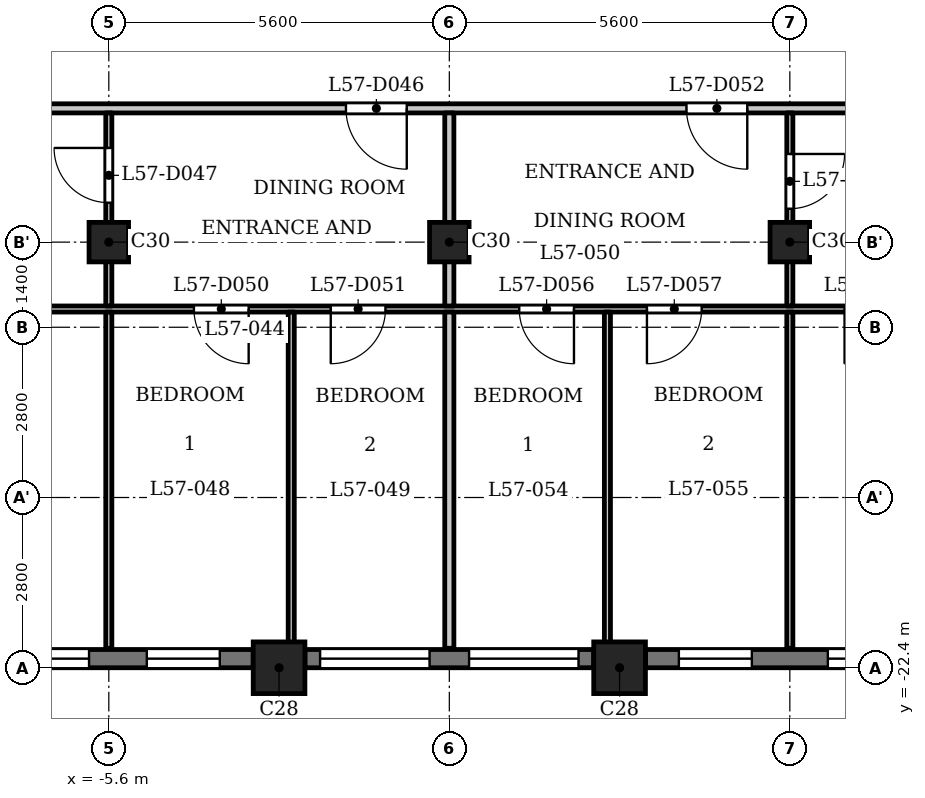
"""IFC4 building model, lengths in metres.
Left out: names, types, materials, properties, quantities, classifications, styles, units other than length and angle.
Written with IfcOpenShell. Run it as: python <this file> out.ifc"""

import sys

from ifc_helpers import new_model, si_unit, direction, frame, frame_2d, origin, origin_2d, place, context, subcontext, project, spatial, rectangle, extrude, element, fill, save


model = new_model("IFC4")
c1 = context("Model", 3, precision=1e-05, world=origin(), true_north=direction((0.0, 1.0)))
c2 = subcontext(c1, "Body", "Model", "MODEL_VIEW")
j1 = project(units=[si_unit("LENGTHUNIT", "METRE"), si_unit("PLANEANGLEUNIT", "RADIAN")], contexts=[c1])
p1 = place(None, origin())
s1 = spatial("IfcSite", under=j1, at=p1, CompositionType="ELEMENT")
p2 = place(p1, origin())
s2 = spatial("IfcBuilding", under=s1, at=p2, CompositionType="ELEMENT")
p3 = place(p2, frame((0.0, 0.0, 220.4)))
s3 = spatial("IfcBuildingStorey", under=s2, at=p3, CompositionType="ELEMENT", Elevation=220.4)
for number, where, z_axis, x_axis in (
    (1, (-2.8, -22.4, 0.0), (0.0, 0.0, 1.0), (1.0, 0.0, 0.0)),
    (2, (2.8, -22.4, 0.0), (0.0, 0.0, 1.0), (1.0, 0.0, 0.0)),
):
    element("IfcColumn", number, at=place(p3, frame(where, z_axis=z_axis, x_axis=x_axis)), inside=s3, PredefinedType="COLUMN", context=c2, shape_type="SweptSolid", body=[
        extrude(rectangle(XDim=0.85, YDim=0.85, at=origin_2d()), origin(), (0.0, 0.0, 1.0), 3.5),
    ])
for number, where, z_axis, x_axis in (
    (3, (-5.6, -15.4, 0.0), (0.0, 0.0, 1.0), (1.0, 0.0, 0.0)),
    (4, (0.0, -15.4, 0.0), (0.0, 0.0, 1.0), (1.0, 0.0, 0.0)),
    (5, (5.6, -15.4, 0.0), (0.0, 0.0, 1.0), (1.0, 0.0, 0.0)),
):
    element("IfcColumn", number, at=place(p3, frame(where, z_axis=z_axis, x_axis=x_axis)), inside=s3, PredefinedType="COLUMN", context=c2, shape_type="SweptSolid", body=[
        extrude(rectangle(XDim=0.65, YDim=0.65, at=origin_2d()), origin(), (0.0, 0.0, 1.0), 3.5),
    ])
p4 = place(p3, frame((-7.975, -22.25, 0.0), z_axis=(0.0, 0.0, 1.0), x_axis=(1.0, 0.0, 0.0)))
e6 = element("IfcWall", 6, at=p4, inside=s3, PredefinedType="SOLIDWALL", context=c2, shape_type="SweptSolid", body=[
    extrude(rectangle(XDim=4.75, YDim=0.3, at=frame_2d((2.375, 0.0))), origin(), (0.0, 0.0, 1.0), 2.5),
])
p5 = place(p4, frame((0.25, 0.0, 0.9)))
e7 = element("IfcOpeningElement", 7, at=p5, cuts=e6, PredefinedType="OPENING", context=c2, shape_type="SweptSolid", body=[
    extrude(rectangle(XDim=1.8, YDim=1.25, at=frame_2d((0.9, 0.625))), frame((0.0, 0.16, 0.0), z_axis=(0.0, -1.0, 0.0), x_axis=(1.0, 0.0, 0.0)), (0.0, 0.0, 1.0), 0.32),
])
p6 = place(p4, frame((3.0, 0.0, 0.6)))
e8 = element("IfcOpeningElement", 8, at=p6, cuts=e6, PredefinedType="OPENING", context=c2, shape_type="SweptSolid", body=[
    extrude(rectangle(XDim=1.2, YDim=1.55, at=frame_2d((0.6, 0.775))), frame((0.0, 0.16, 0.0), z_axis=(0.0, -1.0, 0.0), x_axis=(1.0, 0.0, 0.0)), (0.0, 0.0, 1.0), 0.32),
])
p7 = place(p3, frame((-2.375, -22.25, 0.0), z_axis=(0.0, 0.0, 1.0), x_axis=(1.0, 0.0, 0.0)))
e9 = element("IfcWall", 9, at=p7, inside=s3, PredefinedType="SOLIDWALL", context=c2, shape_type="SweptSolid", body=[
    extrude(rectangle(XDim=4.75, YDim=0.3, at=frame_2d((2.375, 0.0))), origin(), (0.0, 0.0, 1.0), 2.5),
])
p8 = place(p7, frame((0.25, 0.0, 0.9)))
e10 = element("IfcOpeningElement", 10, at=p8, cuts=e9, PredefinedType="OPENING", context=c2, shape_type="SweptSolid", body=[
    extrude(rectangle(XDim=1.8, YDim=1.25, at=frame_2d((0.9, 0.625))), frame((0.0, 0.16, 0.0), z_axis=(0.0, -1.0, 0.0), x_axis=(1.0, 0.0, 0.0)), (0.0, 0.0, 1.0), 0.32),
])
p9 = place(p7, frame((2.7, 0.0, 0.9)))
e11 = element("IfcOpeningElement", 11, at=p9, cuts=e9, PredefinedType="OPENING", context=c2, shape_type="SweptSolid", body=[
    extrude(rectangle(XDim=1.8, YDim=1.25, at=frame_2d((0.9, 0.625))), frame((0.0, 0.16, 0.0), z_axis=(0.0, -1.0, 0.0), x_axis=(1.0, 0.0, 0.0)), (0.0, 0.0, 1.0), 0.32),
])
p10 = place(p3, frame((3.225, -22.25, 0.0), z_axis=(0.0, 0.0, 1.0), x_axis=(1.0, 0.0, 0.0)))
e12 = element("IfcWall", 12, at=p10, inside=s3, PredefinedType="SOLIDWALL", context=c2, shape_type="SweptSolid", body=[
    extrude(rectangle(XDim=4.75, YDim=0.3, at=frame_2d((2.375, 0.0))), origin(), (0.0, 0.0, 1.0), 2.5),
])
p11 = place(p10, frame((0.55, 0.0, 0.6)))
e13 = element("IfcOpeningElement", 13, at=p11, cuts=e12, PredefinedType="OPENING", context=c2, shape_type="SweptSolid", body=[
    extrude(rectangle(XDim=1.2, YDim=1.55, at=frame_2d((0.6, 0.775))), frame((0.0, 0.16, 0.0), z_axis=(0.0, -1.0, 0.0), x_axis=(1.0, 0.0, 0.0)), (0.0, 0.0, 1.0), 0.32),
])
p12 = place(p10, frame((3.0, 0.0, 0.6)))
e14 = element("IfcOpeningElement", 14, at=p12, cuts=e12, PredefinedType="OPENING", context=c2, shape_type="SweptSolid", body=[
    extrude(rectangle(XDim=1.2, YDim=1.55, at=frame_2d((0.6, 0.775))), frame((0.0, 0.16, 0.0), z_axis=(0.0, -1.0, 0.0), x_axis=(1.0, 0.0, 0.0)), (0.0, 0.0, 1.0), 0.32),
])
p13 = place(p3, frame((-16.725, -16.5, 0.0), z_axis=(0.0, 0.0, 1.0), x_axis=(1.0, 0.0, 0.0)))
e15 = element("IfcWall", 15, at=p13, inside=s3, PredefinedType="PARTITIONING", context=c2, shape_type="SweptSolid", body=[
    extrude(rectangle(XDim=33.45, YDim=0.1, at=frame_2d((16.725, 0.0))), origin(), (0.0, 0.0, 1.0), 3.2),
])
p14 = place(p13, frame((0.675, 0.0, 0.0)))
e16 = element("IfcOpeningElement", 16, at=p14, cuts=e15, PredefinedType="OPENING", context=c2, shape_type="SweptSolid", body=[
    extrude(rectangle(XDim=0.8, YDim=2.1, at=frame_2d((0.4, 1.05))), frame((0.0, 0.06, 0.0), z_axis=(0.0, -1.0, 0.0), x_axis=(1.0, 0.0, 0.0)), (0.0, 0.0, 1.0), 0.12),
])
p15 = place(p13, frame((2.775, 0.0, 0.0)))
e17 = element("IfcOpeningElement", 17, at=p15, cuts=e15, PredefinedType="OPENING", context=c2, shape_type="SweptSolid", body=[
    extrude(rectangle(XDim=0.9, YDim=2.1, at=frame_2d((0.45, 1.05))), frame((0.0, 0.06, 0.0), z_axis=(0.0, -1.0, 0.0), x_axis=(1.0, 0.0, 0.0)), (0.0, 0.0, 1.0), 0.12),
])
p16 = place(p13, frame((6.425, 0.0, 0.0)))
e18 = element("IfcOpeningElement", 18, at=p16, cuts=e15, PredefinedType="OPENING", context=c2, shape_type="SweptSolid", body=[
    extrude(rectangle(XDim=0.8, YDim=2.1, at=frame_2d((0.4, 1.05))), frame((0.0, 0.06, 0.0), z_axis=(0.0, -1.0, 0.0), x_axis=(1.0, 0.0, 0.0)), (0.0, 0.0, 1.0), 0.12),
])
p17 = place(p13, frame((8.775, 0.0, 0.0)))
e19 = element("IfcOpeningElement", 19, at=p17, cuts=e15, PredefinedType="OPENING", context=c2, shape_type="SweptSolid", body=[
    extrude(rectangle(XDim=0.9, YDim=2.1, at=frame_2d((0.45, 1.05))), frame((0.0, 0.06, 0.0), z_axis=(0.0, -1.0, 0.0), x_axis=(1.0, 0.0, 0.0)), (0.0, 0.0, 1.0), 0.12),
])
p18 = place(p13, frame((12.525, 0.0, 0.0)))
e20 = element("IfcOpeningElement", 20, at=p18, cuts=e15, PredefinedType="OPENING", context=c2, shape_type="SweptSolid", body=[
    extrude(rectangle(XDim=0.9, YDim=2.1, at=frame_2d((0.45, 1.05))), frame((0.0, 0.06, 0.0), z_axis=(0.0, -1.0, 0.0), x_axis=(1.0, 0.0, 0.0)), (0.0, 0.0, 1.0), 0.12),
])
p19 = place(p13, frame((14.775, 0.0, 0.0)))
e21 = element("IfcOpeningElement", 21, at=p19, cuts=e15, PredefinedType="OPENING", context=c2, shape_type="SweptSolid", body=[
    extrude(rectangle(XDim=0.9, YDim=2.1, at=frame_2d((0.45, 1.05))), frame((0.0, 0.06, 0.0), z_axis=(0.0, -1.0, 0.0), x_axis=(1.0, 0.0, 0.0)), (0.0, 0.0, 1.0), 0.12),
])
p20 = place(p13, frame((25.475, 0.0, 0.0)))
e22 = element("IfcOpeningElement", 22, at=p20, cuts=e15, PredefinedType="OPENING", context=c2, shape_type="SweptSolid", body=[
    extrude(rectangle(XDim=0.8, YDim=2.1, at=frame_2d((0.4, 1.05))), frame((0.0, 0.06, 0.0), z_axis=(0.0, -1.0, 0.0), x_axis=(1.0, 0.0, 0.0)), (0.0, 0.0, 1.0), 0.12),
])
p21 = place(p13, frame((23.225, 0.0, 0.0)))
e23 = element("IfcOpeningElement", 23, at=p21, cuts=e15, PredefinedType="OPENING", context=c2, shape_type="SweptSolid", body=[
    extrude(rectangle(XDim=0.9, YDim=2.1, at=frame_2d((0.45, 1.05))), frame((0.0, 0.06, 0.0), z_axis=(0.0, -1.0, 0.0), x_axis=(1.0, 0.0, 0.0)), (0.0, 0.0, 1.0), 0.12),
])
p22 = place(p13, frame((17.875, 0.0, 0.0)))
e24 = element("IfcOpeningElement", 24, at=p22, cuts=e15, PredefinedType="OPENING", context=c2, shape_type="SweptSolid", body=[
    extrude(rectangle(XDim=0.9, YDim=2.1, at=frame_2d((0.45, 1.05))), frame((0.0, 0.06, 0.0), z_axis=(0.0, -1.0, 0.0), x_axis=(1.0, 0.0, 0.0)), (0.0, 0.0, 1.0), 0.12),
])
p23 = place(p13, frame((19.975, 0.0, 0.0)))
e25 = element("IfcOpeningElement", 25, at=p23, cuts=e15, PredefinedType="OPENING", context=c2, shape_type="SweptSolid", body=[
    extrude(rectangle(XDim=0.9, YDim=2.1, at=frame_2d((0.45, 1.05))), frame((0.0, 0.06, 0.0), z_axis=(0.0, -1.0, 0.0), x_axis=(1.0, 0.0, 0.0)), (0.0, 0.0, 1.0), 0.12),
])
p24 = place(p13, frame((30.825, 0.0, 0.0)))
e26 = element("IfcOpeningElement", 26, at=p24, cuts=e15, PredefinedType="OPENING", context=c2, shape_type="SweptSolid", body=[
    extrude(rectangle(XDim=0.8, YDim=2.1, at=frame_2d((0.4, 1.05))), frame((0.0, 0.06, 0.0), z_axis=(0.0, -1.0, 0.0), x_axis=(1.0, 0.0, 0.0)), (0.0, 0.0, 1.0), 0.12),
])
p25 = place(p13, frame((29.075, 0.0, 0.0)))
e27 = element("IfcOpeningElement", 27, at=p25, cuts=e15, PredefinedType="OPENING", context=c2, shape_type="SweptSolid", body=[
    extrude(rectangle(XDim=0.9, YDim=2.1, at=frame_2d((0.45, 1.05))), frame((0.0, 0.06, 0.0), z_axis=(0.0, -1.0, 0.0), x_axis=(1.0, 0.0, 0.0)), (0.0, 0.0, 1.0), 0.12),
])
p26 = place(p3, frame((-17.4, -13.2, 0.0), z_axis=(0.0, 0.0, 1.0), x_axis=(1.0, 0.0, 0.0)))
e28 = element("IfcWall", 28, at=p26, inside=s3, PredefinedType="PARTITIONING", context=c2, shape_type="SweptSolid", body=[
    extrude(rectangle(XDim=34.8, YDim=0.15, at=frame_2d((17.4, 0.0))), origin(), (0.0, 0.0, 1.0), 3.2),
])
p27 = place(p26, frame((0.15, 0.0, 0.0)))
e29 = element("IfcOpeningElement", 29, at=p27, cuts=e28, PredefinedType="OPENING", context=c2, shape_type="SweptSolid", body=[
    extrude(rectangle(XDim=1.0, YDim=2.1, at=frame_2d((0.5, 1.05))), frame((0.0, 0.085, 0.0), z_axis=(0.0, -1.0, 0.0), x_axis=(1.0, 0.0, 0.0)), (0.0, 0.0, 1.0), 0.17),
])
p28 = place(p26, frame((33.55, 0.0, 0.0)))
e30 = element("IfcOpeningElement", 30, at=p28, cuts=e28, PredefinedType="OPENING", context=c2, shape_type="SweptSolid", body=[
    extrude(rectangle(XDim=1.0, YDim=2.1, at=frame_2d((0.5, 1.05))), frame((0.0, 0.085, 0.0), z_axis=(0.0, -1.0, 0.0), x_axis=(1.0, 0.0, 0.0)), (0.0, 0.0, 1.0), 0.17),
])
p29 = place(p26, frame((3.7, 0.0, 0.0)))
e31 = element("IfcOpeningElement", 31, at=p29, cuts=e28, PredefinedType="OPENING", context=c2, shape_type="SweptSolid", body=[
    extrude(rectangle(XDim=1.0, YDim=2.1, at=frame_2d((0.5, 1.05))), frame((0.0, 0.085, 0.0), z_axis=(0.0, -1.0, 0.0), x_axis=(1.0, 0.0, 0.0)), (0.0, 0.0, 1.0), 0.17),
])
p30 = place(p26, frame((15.7, 0.0, 0.0)))
e32 = element("IfcOpeningElement", 32, at=p30, cuts=e28, PredefinedType="OPENING", context=c2, shape_type="SweptSolid", body=[
    extrude(rectangle(XDim=1.0, YDim=2.1, at=frame_2d((0.5, 1.05))), frame((0.0, 0.085, 0.0), z_axis=(0.0, -1.0, 0.0), x_axis=(1.0, 0.0, 0.0)), (0.0, 0.0, 1.0), 0.17),
])
p31 = place(p26, frame((21.3, 0.0, 0.0)))
e33 = element("IfcOpeningElement", 33, at=p31, cuts=e28, PredefinedType="OPENING", context=c2, shape_type="SweptSolid", body=[
    extrude(rectangle(XDim=1.0, YDim=2.1, at=frame_2d((0.5, 1.05))), frame((0.0, 0.085, 0.0), z_axis=(0.0, -1.0, 0.0), x_axis=(1.0, 0.0, 0.0)), (0.0, 0.0, 1.0), 0.17),
])
p32 = place(p26, frame((29.5, 0.0, 0.0)))
e34 = element("IfcOpeningElement", 34, at=p32, cuts=e28, PredefinedType="OPENING", context=c2, shape_type="SweptSolid", body=[
    extrude(rectangle(XDim=1.0, YDim=2.1, at=frame_2d((0.5, 1.05))), frame((0.0, 0.085, 0.0), z_axis=(0.0, -1.0, 0.0), x_axis=(1.0, 0.0, 0.0)), (0.0, 0.0, 1.0), 0.17),
])
p33 = place(p3, frame((-5.6, -22.08, 0.0), z_axis=(0.0, 0.0, 1.0), x_axis=(0.0, 1.0, 0.0)))
e35 = element("IfcWall", 35, at=p33, inside=s3, PredefinedType="PARTITIONING", context=c2, shape_type="SweptSolid", body=[
    extrude(rectangle(XDim=5.53, YDim=0.1, at=frame_2d((2.765, 0.0))), origin(), (0.0, 0.0, 1.0), 3.2),
])
p34 = place(p3, frame((-5.6, -16.45, 0.0), z_axis=(0.0, 0.0, 1.0), x_axis=(0.0, 1.0, 0.0)))
e36 = element("IfcWall", 36, at=p34, inside=s3, PredefinedType="PARTITIONING", context=c2, shape_type="SweptSolid", body=[
    extrude(rectangle(XDim=3.175, YDim=0.1, at=frame_2d((1.587, 0.0))), origin(), (0.0, 0.0, 1.0), 3.2),
])
p35 = place(p34, frame((1.699, 0.0, 0.0)))
e37 = element("IfcOpeningElement", 37, at=p35, cuts=e36, PredefinedType="OPENING", context=c2, shape_type="SweptSolid", body=[
    extrude(rectangle(XDim=0.9, YDim=2.1, at=frame_2d((0.45, 1.05))), frame((0.0, 0.06, 0.0), z_axis=(0.0, -1.0, 0.0), x_axis=(1.0, 0.0, 0.0)), (0.0, 0.0, 1.0), 0.12),
])
p36 = place(p3, frame((-2.6, -22.805, 0.0), z_axis=(0.0, 0.0, 1.0), x_axis=(0.0, 1.0, 0.0)))
e38 = element("IfcWall", 38, at=p36, inside=s3, PredefinedType="PARTITIONING", context=c2, shape_type="SweptSolid", body=[
    extrude(rectangle(XDim=6.255, YDim=0.1, at=frame_2d((3.127, 0.0))), origin(), (0.0, 0.0, 1.0), 3.2),
])
p37 = place(p3, frame((0.0, -22.08, 0.0), z_axis=(0.0, 0.0, 1.0), x_axis=(0.0, 1.0, 0.0)))
e39 = element("IfcWall", 39, at=p37, inside=s3, PredefinedType="PARTITIONING", context=c2, shape_type="SweptSolid", body=[
    extrude(rectangle(XDim=5.53, YDim=0.15, at=frame_2d((2.765, 0.0))), origin(), (0.0, 0.0, 1.0), 3.2),
])
p38 = place(p3, frame((0.0, -16.45, 0.0), z_axis=(0.0, 0.0, 1.0), x_axis=(0.0, 1.0, 0.0)))
e40 = element("IfcWall", 40, at=p38, inside=s3, PredefinedType="PARTITIONING", context=c2, shape_type="SweptSolid", body=[
    extrude(rectangle(XDim=3.175, YDim=0.15, at=frame_2d((1.587, 0.0))), origin(), (0.0, 0.0, 1.0), 3.2),
])
p39 = place(p3, frame((2.6, -22.805, 0.0), z_axis=(0.0, 0.0, 1.0), x_axis=(0.0, 1.0, 0.0)))
e41 = element("IfcWall", 41, at=p39, inside=s3, PredefinedType="PARTITIONING", context=c2, shape_type="SweptSolid", body=[
    extrude(rectangle(XDim=6.255, YDim=0.1, at=frame_2d((3.127, 0.0))), origin(), (0.0, 0.0, 1.0), 3.2),
])
p40 = place(p3, frame((5.6, -22.08, 0.0), z_axis=(0.0, 0.0, 1.0), x_axis=(0.0, 1.0, 0.0)))
e42 = element("IfcWall", 42, at=p40, inside=s3, PredefinedType="PARTITIONING", context=c2, shape_type="SweptSolid", body=[
    extrude(rectangle(XDim=5.53, YDim=0.1, at=frame_2d((2.765, 0.0))), origin(), (0.0, 0.0, 1.0), 3.2),
])
p41 = place(p3, frame((5.6, -16.45, 0.0), z_axis=(0.0, 0.0, 1.0), x_axis=(0.0, 1.0, 0.0)))
e43 = element("IfcWall", 43, at=p41, inside=s3, PredefinedType="PARTITIONING", context=c2, shape_type="SweptSolid", body=[
    extrude(rectangle(XDim=3.175, YDim=0.1, at=frame_2d((1.587, 0.0))), origin(), (0.0, 0.0, 1.0), 3.2),
])
p42 = place(p41, frame((1.6, 0.0, 0.0)))
e44 = element("IfcOpeningElement", 44, at=p42, cuts=e43, PredefinedType="OPENING", context=c2, shape_type="SweptSolid", body=[
    extrude(rectangle(XDim=0.9, YDim=2.1, at=frame_2d((0.45, 1.05))), frame((0.0, 0.06, 0.0), z_axis=(0.0, -1.0, 0.0), x_axis=(1.0, 0.0, 0.0)), (0.0, 0.0, 1.0), 0.12),
])
p43 = place(p30, origin())
e45 = element("IfcDoor", 45, at=p43, inside=s3, OperationType="SINGLE_SWING_RIGHT", PredefinedType="DOOR", context=c2, shape_type="SweptSolid", body=[
    extrude(rectangle(XDim=1.0, YDim=2.1, at=frame_2d((0.5, 1.05))), frame((0.0, 0.025, 0.0), z_axis=(0.0, -1.0, 0.0), x_axis=(1.0, 0.0, 0.0)), (0.0, 0.0, 1.0), 0.05),
])
fill(e32, e45)
p44 = place(p35, origin())
e46 = element("IfcDoor", 46, at=p44, inside=s3, OperationType="SINGLE_SWING_LEFT", PredefinedType="DOOR", context=c2, shape_type="SweptSolid", body=[
    extrude(rectangle(XDim=0.9, YDim=2.1, at=frame_2d((0.45, 1.05))), frame((0.0, 0.025, 0.0), z_axis=(0.0, -1.0, 0.0), x_axis=(1.0, 0.0, 0.0)), (0.0, 0.0, 1.0), 0.05),
])
fill(e37, e46)
p45 = place(p18, origin())
e47 = element("IfcDoor", 47, at=p45, inside=s3, OperationType="SINGLE_SWING_RIGHT", PredefinedType="DOOR", context=c2, shape_type="SweptSolid", body=[
    extrude(rectangle(XDim=0.9, YDim=2.1, at=frame_2d((0.45, 1.05))), frame((0.0, 0.025, 0.0), z_axis=(0.0, -1.0, 0.0), x_axis=(1.0, 0.0, 0.0)), (0.0, 0.0, 1.0), 0.05),
])
fill(e20, e47)
p46 = place(p19, origin())
e48 = element("IfcDoor", 48, at=p46, inside=s3, OperationType="SINGLE_SWING_LEFT", PredefinedType="DOOR", context=c2, shape_type="SweptSolid", body=[
    extrude(rectangle(XDim=0.9, YDim=2.1, at=frame_2d((0.45, 1.05))), frame((0.0, 0.025, 0.0), z_axis=(0.0, -1.0, 0.0), x_axis=(1.0, 0.0, 0.0)), (0.0, 0.0, 1.0), 0.05),
])
fill(e21, e48)
p47 = place(p31, origin())
e49 = element("IfcDoor", 49, at=p47, inside=s3, OperationType="SINGLE_SWING_RIGHT", PredefinedType="DOOR", context=c2, shape_type="SweptSolid", body=[
    extrude(rectangle(XDim=1.0, YDim=2.1, at=frame_2d((0.5, 1.05))), frame((0.0, 0.025, 0.0), z_axis=(0.0, -1.0, 0.0), x_axis=(1.0, 0.0, 0.0)), (0.0, 0.0, 1.0), 0.05),
])
fill(e33, e49)
p48 = place(p42, origin())
e50 = element("IfcDoor", 50, at=p48, inside=s3, OperationType="SINGLE_SWING_RIGHT", PredefinedType="DOOR", context=c2, shape_type="SweptSolid", body=[
    extrude(rectangle(XDim=0.9, YDim=2.1, at=frame_2d((0.45, 1.05))), frame((0.0, 0.025, 0.0), z_axis=(0.0, -1.0, 0.0), x_axis=(1.0, 0.0, 0.0)), (0.0, 0.0, 1.0), 0.05),
])
fill(e44, e50)
p49 = place(p21, origin())
e51 = element("IfcDoor", 51, at=p49, inside=s3, OperationType="SINGLE_SWING_LEFT", PredefinedType="DOOR", context=c2, shape_type="SweptSolid", body=[
    extrude(rectangle(XDim=0.9, YDim=2.1, at=frame_2d((0.45, 1.05))), frame((0.0, 0.025, 0.0), z_axis=(0.0, -1.0, 0.0), x_axis=(1.0, 0.0, 0.0)), (0.0, 0.0, 1.0), 0.05),
])
fill(e23, e51)
p50 = place(p22, origin())
e52 = element("IfcDoor", 52, at=p50, inside=s3, OperationType="SINGLE_SWING_RIGHT", PredefinedType="DOOR", context=c2, shape_type="SweptSolid", body=[
    extrude(rectangle(XDim=0.9, YDim=2.1, at=frame_2d((0.45, 1.05))), frame((0.0, 0.025, 0.0), z_axis=(0.0, -1.0, 0.0), x_axis=(1.0, 0.0, 0.0)), (0.0, 0.0, 1.0), 0.05),
])
fill(e24, e52)
p51 = place(p23, origin())
e53 = element("IfcDoor", 53, at=p51, inside=s3, OperationType="SINGLE_SWING_LEFT", PredefinedType="DOOR", context=c2, shape_type="SweptSolid", body=[
    extrude(rectangle(XDim=0.9, YDim=2.1, at=frame_2d((0.45, 1.05))), frame((0.0, 0.025, 0.0), z_axis=(0.0, -1.0, 0.0), x_axis=(1.0, 0.0, 0.0)), (0.0, 0.0, 1.0), 0.05),
])
fill(e25, e53)
p52 = place(p5, origin())
e54 = element("IfcWindow", 54, at=p52, inside=s3, PartitioningType="SINGLE_PANEL", PredefinedType="WINDOW", context=c2, shape_type="SweptSolid", body=[
    extrude(rectangle(XDim=1.8, YDim=1.25, at=frame_2d((0.9, 0.625))), frame((0.0, 0.03, 0.0), z_axis=(0.0, -1.0, 0.0), x_axis=(1.0, 0.0, 0.0)), (0.0, 0.0, 1.0), 0.06),
])
fill(e7, e54)
p53 = place(p6, origin())
e55 = element("IfcWindow", 55, at=p53, inside=s3, PartitioningType="SINGLE_PANEL", PredefinedType="WINDOW", context=c2, shape_type="SweptSolid", body=[
    extrude(rectangle(XDim=1.2, YDim=1.55, at=frame_2d((0.6, 0.775))), frame((0.0, 0.03, 0.0), z_axis=(0.0, -1.0, 0.0), x_axis=(1.0, 0.0, 0.0)), (0.0, 0.0, 1.0), 0.06),
])
fill(e8, e55)
p54 = place(p8, origin())
e56 = element("IfcWindow", 56, at=p54, inside=s3, PartitioningType="SINGLE_PANEL", PredefinedType="WINDOW", context=c2, shape_type="SweptSolid", body=[
    extrude(rectangle(XDim=1.8, YDim=1.25, at=frame_2d((0.9, 0.625))), frame((0.0, 0.03, 0.0), z_axis=(0.0, -1.0, 0.0), x_axis=(1.0, 0.0, 0.0)), (0.0, 0.0, 1.0), 0.06),
])
fill(e10, e56)
p55 = place(p9, origin())
e57 = element("IfcWindow", 57, at=p55, inside=s3, PartitioningType="SINGLE_PANEL", PredefinedType="WINDOW", context=c2, shape_type="SweptSolid", body=[
    extrude(rectangle(XDim=1.8, YDim=1.25, at=frame_2d((0.9, 0.625))), frame((0.0, 0.03, 0.0), z_axis=(0.0, -1.0, 0.0), x_axis=(1.0, 0.0, 0.0)), (0.0, 0.0, 1.0), 0.06),
])
fill(e11, e57)
p56 = place(p11, origin())
e58 = element("IfcWindow", 58, at=p56, inside=s3, PartitioningType="SINGLE_PANEL", PredefinedType="WINDOW", context=c2, shape_type="SweptSolid", body=[
    extrude(rectangle(XDim=1.2, YDim=1.55, at=frame_2d((0.6, 0.775))), frame((0.0, 0.03, 0.0), z_axis=(0.0, -1.0, 0.0), x_axis=(1.0, 0.0, 0.0)), (0.0, 0.0, 1.0), 0.06),
])
fill(e13, e58)
p57 = place(p12, origin())
e59 = element("IfcWindow", 59, at=p57, inside=s3, PartitioningType="SINGLE_PANEL", PredefinedType="WINDOW", context=c2, shape_type="SweptSolid", body=[
    extrude(rectangle(XDim=1.2, YDim=1.55, at=frame_2d((0.6, 0.775))), frame((0.0, 0.03, 0.0), z_axis=(0.0, -1.0, 0.0), x_axis=(1.0, 0.0, 0.0)), (0.0, 0.0, 1.0), 0.06),
])
fill(e14, e59)
save(model, sys.argv[1])
